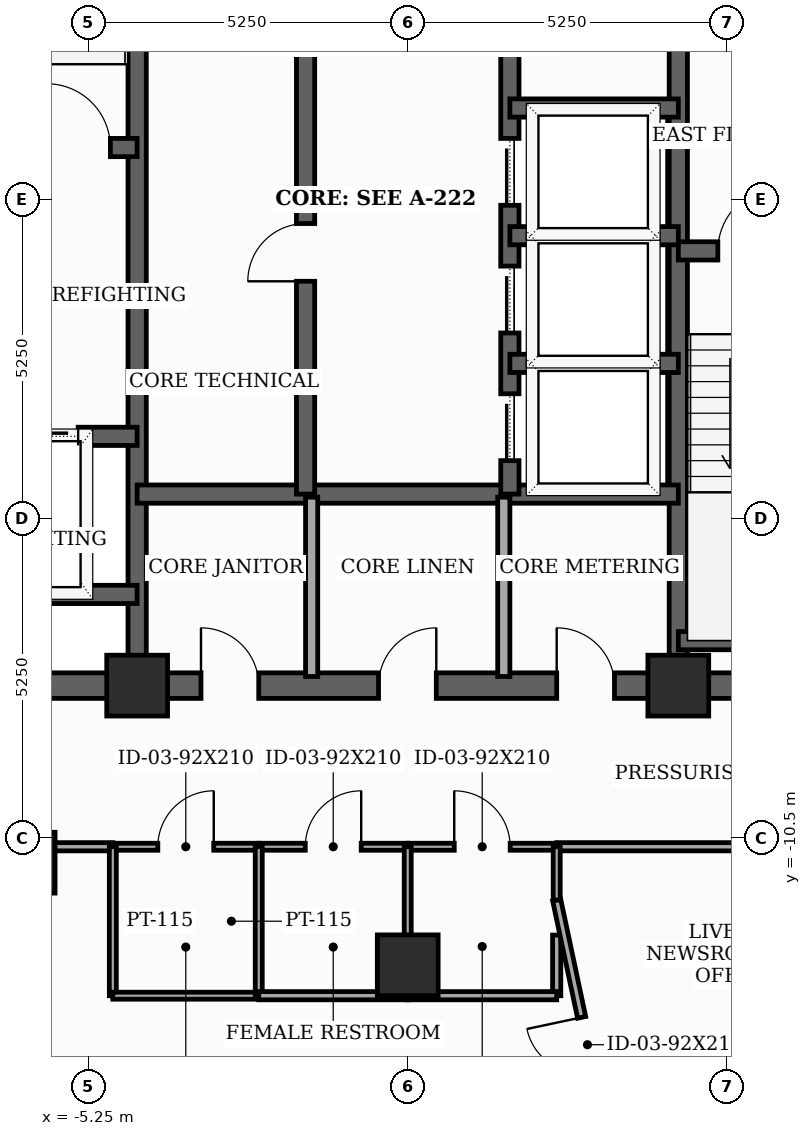
"""IFC4 building model, lengths in metres.
Left out: names, types, materials, properties, quantities, classifications, styles, units other than length and angle.
Written with IfcOpenShell. Run it as: python <this file> out.ifc"""

import sys

from ifc_helpers import new_model, si_unit, direction, frame, frame_2d, origin, origin_2d, place, context, subcontext, project, spatial, rectangle, extrude, element, fill, save


model = new_model("IFC4")
c1 = context("Model", 3, precision=1e-05, world=origin(), true_north=direction((0.0, 1.0)))
c2 = subcontext(c1, "Body", "Model", "MODEL_VIEW")
j1 = project(units=[si_unit("LENGTHUNIT", "METRE"), si_unit("PLANEANGLEUNIT", "RADIAN")], contexts=[c1])
p1 = place(None, origin())
s1 = spatial("IfcSite", under=j1, at=p1, CompositionType="ELEMENT")
p2 = place(p1, origin())
s2 = spatial("IfcBuilding", under=s1, at=p2, CompositionType="ELEMENT")
p3 = place(p2, frame((0.0, 0.0, 267.0)))
s3 = spatial("IfcBuildingStorey", under=s2, at=p3, CompositionType="ELEMENT", Elevation=267.0)
for number, where, z_axis, x_axis in (
    (1, (-4.45, -8.0, 0.0), (0.0, 0.0, 1.0), (1.0, 0.0, 0.0)),
    (2, (4.45, -8.0, 0.0), (0.0, 0.0, 1.0), (1.0, 0.0, 0.0)),
    (3, (-6.3, -10.912, 0.0), (0.0, 0.0, 1.0), (1.0, 0.0, 0.0)),
    (4, (0.0, -12.6, 0.0), (0.0, 0.0, 1.0), (1.0, 0.0, 0.0)),
):
    element("IfcColumn", number, at=place(p3, frame(where, z_axis=z_axis, x_axis=x_axis)), inside=s3, PredefinedType="COLUMN", context=c2, shape_type="SweptSolid", body=[
        extrude(rectangle(XDim=1.0, YDim=1.0, at=origin_2d()), origin(), (0.0, 0.0, 1.0), 3.7),
    ])
p4 = place(p3, frame((-8.0, -8.0, 0.0), z_axis=(0.0, 0.0, 1.0), x_axis=(1.0, 0.0, 0.0)))
e5 = element("IfcWall", 5, at=p4, inside=s3, PredefinedType="SHEAR", context=c2, shape_type="SweptSolid", body=[
    extrude(rectangle(XDim=16.0, YDim=0.42, at=frame_2d((8.0, 0.0))), origin(), (0.0, 0.0, 1.0), 3.5),
])
p5 = place(p4, frame((4.6, 0.0, 0.0)))
e6 = element("IfcOpeningElement", 6, at=p5, cuts=e5, PredefinedType="OPENING", context=c2, shape_type="SweptSolid", body=[
    extrude(rectangle(XDim=0.95, YDim=2.1, at=frame_2d((0.475, 1.05))), frame((0.0, 0.22, 0.0), z_axis=(0.0, -1.0, 0.0), x_axis=(1.0, 0.0, 0.0)), (0.0, 0.0, 1.0), 0.44),
])
p6 = place(p4, frame((7.52, 0.0, 0.0)))
e7 = element("IfcOpeningElement", 7, at=p6, cuts=e5, PredefinedType="OPENING", context=c2, shape_type="SweptSolid", body=[
    extrude(rectangle(XDim=0.95, YDim=2.1, at=frame_2d((0.475, 1.05))), frame((0.0, 0.22, 0.0), z_axis=(0.0, -1.0, 0.0), x_axis=(1.0, 0.0, 0.0)), (0.0, 0.0, 1.0), 0.44),
])
p7 = place(p4, frame((10.45, 0.0, 0.0)))
e8 = element("IfcOpeningElement", 8, at=p7, cuts=e5, PredefinedType="OPENING", context=c2, shape_type="SweptSolid", body=[
    extrude(rectangle(XDim=0.95, YDim=2.1, at=frame_2d((0.475, 1.05))), frame((0.0, 0.22, 0.0), z_axis=(0.0, -1.0, 0.0), x_axis=(1.0, 0.0, 0.0)), (0.0, 0.0, 1.0), 0.44),
])
for number, where, z_axis, x_axis in (
    (9, (-4.45, -7.79, 0.0), (0.0, 0.0, 1.0), (0.0, 1.0, 0.0)),
    (10, (4.45, -7.79, 0.0), (0.0, 0.0, 1.0), (0.0, 1.0, 0.0)),
):
    element("IfcWall", number, at=place(p3, frame(where, z_axis=z_axis, x_axis=x_axis)), inside=s3, PredefinedType="SHEAR", context=c2, shape_type="SweptSolid", body=[
        extrude(rectangle(XDim=15.58, YDim=0.3, at=frame_2d((7.79, 0.0))), origin(), (0.0, 0.0, 1.0), 3.5),
    ])
p8 = place(p3, frame((-7.79, 0.85, 0.0), z_axis=(0.0, 0.0, 1.0), x_axis=(1.0, 0.0, 0.0)))
e11 = element("IfcWall", 11, at=p8, inside=s3, PredefinedType="SHEAR", context=c2, shape_type="SweptSolid", body=[
    extrude(rectangle(XDim=3.34, YDim=0.3, at=frame_2d((1.67, 0.0))), origin(), (0.0, 0.0, 1.0), 3.5),
])
p9 = place(p8, frame((1.85, 0.0, 0.0)))
e12 = element("IfcOpeningElement", 12, at=p9, cuts=e11, PredefinedType="OPENING", context=c2, shape_type="SweptSolid", body=[
    extrude(rectangle(XDim=1.05, YDim=2.15, at=frame_2d((0.525, 1.075))), frame((0.0, 0.16, 0.0), z_axis=(0.0, -1.0, 0.0), x_axis=(1.0, 0.0, 0.0)), (0.0, 0.0, 1.0), 0.32),
])
p10 = place(p3, frame((4.45, -0.85, 0.0), z_axis=(0.0, 0.0, 1.0), x_axis=(1.0, 0.0, 0.0)))
e13 = element("IfcWall", 13, at=p10, inside=s3, PredefinedType="SHEAR", context=c2, shape_type="SweptSolid", body=[
    extrude(rectangle(XDim=3.34, YDim=0.3, at=frame_2d((1.67, 0.0))), origin(), (0.0, 0.0, 1.0), 3.5),
])
p11 = place(p10, frame((0.65, 0.0, 0.0)))
e14 = element("IfcOpeningElement", 14, at=p11, cuts=e13, PredefinedType="OPENING", context=c2, shape_type="SweptSolid", body=[
    extrude(rectangle(XDim=1.05, YDim=2.15, at=frame_2d((0.525, 1.075))), frame((0.0, 0.16, 0.0), z_axis=(0.0, -1.0, 0.0), x_axis=(1.0, 0.0, 0.0)), (0.0, 0.0, 1.0), 0.32),
])
p12 = place(p3, frame((4.45, -7.26, 0.0), z_axis=(0.0, 0.0, 1.0), x_axis=(1.0, 0.0, 0.0)))
e15 = element("IfcWall", 15, at=p12, inside=s3, PredefinedType="SHEAR", context=c2, shape_type="SweptSolid", body=[
    extrude(rectangle(XDim=3.55, YDim=0.3, at=frame_2d((1.775, 0.0))), origin(), (0.0, 0.0, 1.0), 3.5),
])
p13 = place(p3, frame((-7.79, -3.9, 0.0), z_axis=(0.0, 0.0, 1.0), x_axis=(1.0, 0.0, 0.0)))
e16 = element("IfcWall", 16, at=p13, inside=s3, PredefinedType="SHEAR", context=c2, shape_type="SweptSolid", body=[
    extrude(rectangle(XDim=3.34, YDim=0.3, at=frame_2d((1.67, 0.0))), origin(), (0.0, 0.0, 1.0), 3.5),
])
p14 = place(p13, frame((1.27, 0.0, 0.0)))
e17 = element("IfcOpeningElement", 17, at=p14, cuts=e16, PredefinedType="OPENING", context=c2, shape_type="SweptSolid", body=[
    extrude(rectangle(XDim=1.1, YDim=2.1, at=frame_2d((0.55, 1.05))), frame((0.0, 0.16, 0.0), z_axis=(0.0, -1.0, 0.0), x_axis=(1.0, 0.0, 0.0)), (0.0, 0.0, 1.0), 0.32),
])
p15 = place(p3, frame((-7.79, -6.5, 0.0), z_axis=(0.0, 0.0, 1.0), x_axis=(1.0, 0.0, 0.0)))
e18 = element("IfcWall", 18, at=p15, inside=s3, PredefinedType="SHEAR", context=c2, shape_type="SweptSolid", body=[
    extrude(rectangle(XDim=3.34, YDim=0.3, at=frame_2d((1.67, 0.0))), origin(), (0.0, 0.0, 1.0), 3.5),
])
p16 = place(p3, frame((-4.45, -4.85, 0.0), z_axis=(0.0, 0.0, 1.0), x_axis=(1.0, 0.0, 0.0)))
e19 = element("IfcWall", 19, at=p16, inside=s3, PredefinedType="SHEAR", context=c2, shape_type="SweptSolid", body=[
    extrude(rectangle(XDim=8.9, YDim=0.3, at=frame_2d((4.45, 0.0))), origin(), (0.0, 0.0, 1.0), 3.5),
])
p17 = place(p3, frame((-1.68, -4.85, 0.0), z_axis=(0.0, 0.0, 1.0), x_axis=(0.0, 1.0, 0.0)))
e20 = element("IfcWall", 20, at=p17, inside=s3, PredefinedType="SHEAR", context=c2, shape_type="SweptSolid", body=[
    extrude(rectangle(XDim=12.64, YDim=0.3, at=frame_2d((6.32, 0.0))), origin(), (0.0, 0.0, 1.0), 3.5),
])
p18 = place(p17, frame((3.5, 0.0, 0.0)))
e21 = element("IfcOpeningElement", 21, at=p18, cuts=e20, PredefinedType="OPENING", context=c2, shape_type="SweptSolid", body=[
    extrude(rectangle(XDim=0.95, YDim=2.1, at=frame_2d((0.475, 1.05))), frame((0.0, 0.16, 0.0), z_axis=(0.0, -1.0, 0.0), x_axis=(1.0, 0.0, 0.0)), (0.0, 0.0, 1.0), 0.32),
])
p19 = place(p17, frame((9.8, 0.0, 0.0)))
e22 = element("IfcOpeningElement", 22, at=p19, cuts=e20, PredefinedType="OPENING", context=c2, shape_type="SweptSolid", body=[
    extrude(rectangle(XDim=0.95, YDim=2.1, at=frame_2d((0.475, 1.05))), frame((0.0, 0.16, 0.0), z_axis=(0.0, -1.0, 0.0), x_axis=(1.0, 0.0, 0.0)), (0.0, 0.0, 1.0), 0.32),
])
p20 = place(p3, frame((1.68, -4.85, 0.0), z_axis=(0.0, 0.0, 1.0), x_axis=(0.0, 1.0, 0.0)))
e23 = element("IfcWall", 23, at=p20, inside=s3, PredefinedType="SHEAR", context=c2, shape_type="SweptSolid", body=[
    extrude(rectangle(XDim=12.64, YDim=0.3, at=frame_2d((6.32, 0.0))), origin(), (0.0, 0.0, 1.0), 3.5),
])
p21 = place(p20, frame((0.55, 0.0, 0.0)))
e24 = element("IfcOpeningElement", 24, at=p21, cuts=e23, PredefinedType="OPENING", context=c2, shape_type="SweptSolid", body=[
    extrude(rectangle(XDim=1.1, YDim=2.1, at=frame_2d((0.55, 1.05))), frame((0.0, 0.16, 0.0), z_axis=(0.0, -1.0, 0.0), x_axis=(1.0, 0.0, 0.0)), (0.0, 0.0, 1.0), 0.32),
])
p22 = place(p20, frame((2.65, 0.0, 0.0)))
e25 = element("IfcOpeningElement", 25, at=p22, cuts=e23, PredefinedType="OPENING", context=c2, shape_type="SweptSolid", body=[
    extrude(rectangle(XDim=1.1, YDim=2.1, at=frame_2d((0.55, 1.05))), frame((0.0, 0.16, 0.0), z_axis=(0.0, -1.0, 0.0), x_axis=(1.0, 0.0, 0.0)), (0.0, 0.0, 1.0), 0.32),
])
p23 = place(p20, frame((4.75, 0.0, 0.0)))
e26 = element("IfcOpeningElement", 26, at=p23, cuts=e23, PredefinedType="OPENING", context=c2, shape_type="SweptSolid", body=[
    extrude(rectangle(XDim=1.1, YDim=2.1, at=frame_2d((0.55, 1.05))), frame((0.0, 0.16, 0.0), z_axis=(0.0, -1.0, 0.0), x_axis=(1.0, 0.0, 0.0)), (0.0, 0.0, 1.0), 0.32),
])
p24 = place(p20, frame((8.9, 0.0, 0.0)))
e27 = element("IfcOpeningElement", 27, at=p24, cuts=e23, PredefinedType="OPENING", context=c2, shape_type="SweptSolid", body=[
    extrude(rectangle(XDim=0.95, YDim=2.1, at=frame_2d((0.475, 1.05))), frame((0.0, 0.16, 0.0), z_axis=(0.0, -1.0, 0.0), x_axis=(1.0, 0.0, 0.0)), (0.0, 0.0, 1.0), 0.32),
])
for number, where, z_axis, x_axis in (
    (28, (1.68, 1.5, 0.0), (0.0, 0.0, 1.0), (1.0, 0.0, 0.0)),
    (29, (1.68, -2.7, 0.0), (0.0, 0.0, 1.0), (1.0, 0.0, 0.0)),
    (30, (1.68, -0.6, 0.0), (0.0, 0.0, 1.0), (1.0, 0.0, 0.0)),
):
    element("IfcWall", number, at=place(p3, frame(where, z_axis=z_axis, x_axis=x_axis)), inside=s3, PredefinedType="SHEAR", context=c2, shape_type="SweptSolid", body=[
        extrude(rectangle(XDim=2.77, YDim=0.3, at=frame_2d((1.385, 0.0))), origin(), (0.0, 0.0, 1.0), 3.5),
    ])
for number, where, z_axis, x_axis in (
    (31, (-1.58, -7.85, 0.0), (0.0, 0.0, 1.0), (0.0, 1.0, 0.0)),
    (32, (1.58, -7.85, 0.0), (0.0, 0.0, 1.0), (0.0, 1.0, 0.0)),
):
    element("IfcWall", number, at=place(p3, frame(where, z_axis=z_axis, x_axis=x_axis)), inside=s3, PredefinedType="SOLIDWALL", context=c2, shape_type="SweptSolid", body=[
        extrude(rectangle(XDim=2.95, YDim=0.2, at=frame_2d((1.475, 0.0))), origin(), (0.0, 0.0, 1.0), 2.885),
    ])
p25 = place(p3, frame((-4.85, -10.65, 0.0), z_axis=(0.0, 0.0, 1.0), x_axis=(1.0, 0.0, 0.0)))
e33 = element("IfcWall", 33, at=p25, inside=s3, PredefinedType="PARTITIONING", context=c2, shape_type="SweptSolid", body=[
    extrude(rectangle(XDim=2.4, YDim=0.115, at=frame_2d((1.2, 0.0))), origin(), (0.0, 0.0, 1.0), 3.5),
])
p26 = place(p25, frame((0.74, 0.0, 0.0)))
e34 = element("IfcOpeningElement", 34, at=p26, cuts=e33, PredefinedType="OPENING", context=c2, shape_type="SweptSolid", body=[
    extrude(rectangle(XDim=0.92, YDim=2.1, at=frame_2d((0.46, 1.05))), frame((0.0, 0.067, 0.0), z_axis=(0.0, -1.0, 0.0), x_axis=(1.0, 0.0, 0.0)), (0.0, 0.0, 1.0), 0.135),
])
p27 = place(p3, frame((-10.15, -10.65, 0.0), z_axis=(0.0, 0.0, 1.0), x_axis=(1.0, 0.0, 0.0)))
e35 = element("IfcWall", 35, at=p27, inside=s3, PredefinedType="PARTITIONING", context=c2, shape_type="SweptSolid", body=[
    extrude(rectangle(XDim=5.3, YDim=0.135, at=frame_2d((2.65, 0.0))), origin(), (0.0, 0.0, 1.0), 2.885),
])
p28 = place(p3, frame((-2.45, -10.65, 0.0), z_axis=(0.0, 0.0, 1.0), x_axis=(1.0, 0.0, 0.0)))
e36 = element("IfcWall", 36, at=p28, inside=s3, PredefinedType="PARTITIONING", context=c2, shape_type="SweptSolid", body=[
    extrude(rectangle(XDim=2.45, YDim=0.115, at=frame_2d((1.225, 0.0))), origin(), (0.0, 0.0, 1.0), 2.885),
])
p29 = place(p28, frame((0.765, 0.0, 0.0)))
e37 = element("IfcOpeningElement", 37, at=p29, cuts=e36, PredefinedType="OPENING", context=c2, shape_type="SweptSolid", body=[
    extrude(rectangle(XDim=0.92, YDim=2.1, at=frame_2d((0.46, 1.05))), frame((0.0, 0.067, 0.0), z_axis=(0.0, -1.0, 0.0), x_axis=(1.0, 0.0, 0.0)), (0.0, 0.0, 1.0), 0.135),
])
p30 = place(p3, frame((0.0, -10.65, 0.0), z_axis=(0.0, 0.0, 1.0), x_axis=(1.0, 0.0, 0.0)))
e38 = element("IfcWall", 38, at=p30, inside=s3, PredefinedType="PARTITIONING", context=c2, shape_type="SweptSolid", body=[
    extrude(rectangle(XDim=2.45, YDim=0.115, at=frame_2d((1.225, 0.0))), origin(), (0.0, 0.0, 1.0), 3.5),
])
p31 = place(p30, frame((0.765, 0.0, 0.0)))
e39 = element("IfcOpeningElement", 39, at=p31, cuts=e38, PredefinedType="OPENING", context=c2, shape_type="SweptSolid", body=[
    extrude(rectangle(XDim=0.92, YDim=2.1, at=frame_2d((0.46, 1.05))), frame((0.0, 0.067, 0.0), z_axis=(0.0, -1.0, 0.0), x_axis=(1.0, 0.0, 0.0)), (0.0, 0.0, 1.0), 0.135),
])
p32 = place(p3, frame((2.45, -10.65, 0.0), z_axis=(0.0, 0.0, 1.0), x_axis=(1.0, 0.0, 0.0)))
e40 = element("IfcWall", 40, at=p32, inside=s3, PredefinedType="PARTITIONING", context=c2, shape_type="SweptSolid", body=[
    extrude(rectangle(XDim=7.7, YDim=0.135, at=frame_2d((3.85, 0.0))), origin(), (0.0, 0.0, 1.0), 2.885),
])
p33 = place(p3, frame((-4.85, -10.65, 0.0), z_axis=(0.0, 0.0, 1.0), x_axis=(0.0, -1.0, 0.0)))
e41 = element("IfcWall", 41, at=p33, inside=s3, PredefinedType="PARTITIONING", context=c2, shape_type="SweptSolid", body=[
    extrude(rectangle(XDim=2.45, YDim=0.115, at=frame_2d((1.225, 0.0))), origin(), (0.0, 0.0, 1.0), 2.885),
])
p34 = place(p3, frame((-4.85, -13.1, 0.0), z_axis=(0.0, 0.0, 1.0), x_axis=(1.0, 0.0, 0.0)))
e42 = element("IfcWall", 42, at=p34, inside=s3, PredefinedType="PARTITIONING", context=c2, shape_type="SweptSolid", body=[
    extrude(rectangle(XDim=2.4, YDim=0.115, at=frame_2d((1.2, 0.0))), origin(), (0.0, 0.0, 1.0), 3.5),
])
p35 = place(p3, frame((-2.45, -13.1, 0.0), z_axis=(0.0, 0.0, 1.0), x_axis=(0.0, 1.0, 0.0)))
e43 = element("IfcWall", 43, at=p35, inside=s3, PredefinedType="PARTITIONING", context=c2, shape_type="SweptSolid", body=[
    extrude(rectangle(XDim=2.45, YDim=0.115, at=frame_2d((1.225, 0.0))), origin(), (0.0, 0.0, 1.0), 2.885),
])
p36 = place(p3, frame((0.0, -13.1, 0.0), z_axis=(0.0, 0.0, 1.0), x_axis=(-1.0, 0.0, 0.0)))
e44 = element("IfcWall", 44, at=p36, inside=s3, PredefinedType="PARTITIONING", context=c2, shape_type="SweptSolid", body=[
    extrude(rectangle(XDim=2.45, YDim=0.135, at=frame_2d((1.225, 0.0))), origin(), (0.0, 0.0, 1.0), 3.5),
])
p37 = place(p3, frame((2.45, -12.103, 0.0), z_axis=(0.0, 0.0, 1.0), x_axis=(0.0, -1.0, 0.0)))
e45 = element("IfcWall", 45, at=p37, inside=s3, PredefinedType="PARTITIONING", context=c2, shape_type="SweptSolid", body=[
    extrude(rectangle(XDim=0.997, YDim=0.135, at=frame_2d((0.499, 0.0))), origin(), (0.0, 0.0, 1.0), 2.885),
])
p38 = place(p3, frame((2.45, -13.1, 0.0), z_axis=(0.0, 0.0, 1.0), x_axis=(-1.0, 0.0, 0.0)))
e46 = element("IfcWall", 46, at=p38, inside=s3, PredefinedType="PARTITIONING", context=c2, shape_type="SweptSolid", body=[
    extrude(rectangle(XDim=2.45, YDim=0.135, at=frame_2d((1.225, 0.0))), origin(), (0.0, 0.0, 1.0), 3.5),
])
p39 = place(p3, frame((3.266, -15.365, 0.0), z_axis=(0.0, 0.0, 1.0), x_axis=(-0.207944308429, 0.978140667078, 0.0)))
e47 = element("IfcWall", 47, at=p39, inside=s3, PredefinedType="PARTITIONING", context=c2, shape_type="SweptSolid", body=[
    extrude(rectangle(XDim=3.925, YDim=0.135, at=frame_2d((1.962, 0.0))), origin(), (0.0, 0.0, 1.0), 2.885),
])
p40 = place(p39, frame((1.031, 0.0, 0.0)))
e48 = element("IfcOpeningElement", 48, at=p40, cuts=e47, PredefinedType="OPENING", context=c2, shape_type="SweptSolid", body=[
    extrude(rectangle(XDim=0.92, YDim=2.1, at=frame_2d((0.46, 1.05))), frame((0.0, 0.077, 0.0), z_axis=(0.0, -1.0, 0.0), x_axis=(1.0, 0.0, 0.0)), (0.0, 0.0, 1.0), 0.155),
])
p41 = place(p3, frame((0.0, -13.1, 0.0), z_axis=(0.0, 0.0, 1.0), x_axis=(0.0, 1.0, 0.0)))
e49 = element("IfcWall", 49, at=p41, inside=s3, PredefinedType="PARTITIONING", context=c2, shape_type="SweptSolid", body=[
    extrude(rectangle(XDim=2.45, YDim=0.115, at=frame_2d((1.225, 0.0))), origin(), (0.0, 0.0, 1.0), 2.885),
])
p42 = place(p3, frame((2.45, -11.526, 0.0), z_axis=(0.0, 0.0, 1.0), x_axis=(0.0, 1.0, 0.0)))
e50 = element("IfcWall", 50, at=p42, inside=s3, PredefinedType="PARTITIONING", context=c2, shape_type="SweptSolid", body=[
    extrude(rectangle(XDim=0.876, YDim=0.115, at=frame_2d((0.438, 0.0))), origin(), (0.0, 0.0, 1.0), 3.5),
])
p43 = place(p3, frame((9.509, -12.618, 0.0), z_axis=(0.0, 0.0, 1.0), x_axis=(-0.915305003879, -0.402761405641, 0.0)))
e51 = element("IfcWall", 51, at=p43, inside=s3, PredefinedType="PARTITIONING", context=c2, shape_type="SweptSolid", body=[
    extrude(rectangle(XDim=6.821, YDim=0.135, at=frame_2d((3.41, 0.0))), origin(), (0.0, 0.0, 1.0), 3.035),
])
p44 = place(p5, origin())
e52 = element("IfcDoor", 52, at=p44, inside=s3, OperationType="SINGLE_SWING_LEFT", PredefinedType="DOOR", context=c2, shape_type="SweptSolid", body=[
    extrude(rectangle(XDim=0.95, YDim=2.1, at=frame_2d((0.475, 1.05))), frame((0.0, 0.025, 0.0), z_axis=(0.0, -1.0, 0.0), x_axis=(1.0, 0.0, 0.0)), (0.0, 0.0, 1.0), 0.05),
])
fill(e6, e52)
p45 = place(p6, origin())
e53 = element("IfcDoor", 53, at=p45, inside=s3, OperationType="SINGLE_SWING_RIGHT", PredefinedType="DOOR", context=c2, shape_type="SweptSolid", body=[
    extrude(rectangle(XDim=0.95, YDim=2.1, at=frame_2d((0.475, 1.05))), frame((0.0, 0.025, 0.0), z_axis=(0.0, -1.0, 0.0), x_axis=(1.0, 0.0, 0.0)), (0.0, 0.0, 1.0), 0.05),
])
fill(e7, e53)
p46 = place(p7, origin())
e54 = element("IfcDoor", 54, at=p46, inside=s3, OperationType="SINGLE_SWING_LEFT", PredefinedType="DOOR", context=c2, shape_type="SweptSolid", body=[
    extrude(rectangle(XDim=0.95, YDim=2.1, at=frame_2d((0.475, 1.05))), frame((0.0, 0.025, 0.0), z_axis=(0.0, -1.0, 0.0), x_axis=(1.0, 0.0, 0.0)), (0.0, 0.0, 1.0), 0.05),
])
fill(e8, e54)
p47 = place(p9, origin())
e55 = element("IfcDoor", 55, at=p47, inside=s3, OperationType="SINGLE_SWING_LEFT", PredefinedType="DOOR", context=c2, shape_type="SweptSolid", body=[
    extrude(rectangle(XDim=1.05, YDim=2.15, at=frame_2d((0.525, 1.075))), frame((0.0, 0.025, 0.0), z_axis=(0.0, -1.0, 0.0), x_axis=(1.0, 0.0, 0.0)), (0.0, 0.0, 1.0), 0.05),
])
fill(e12, e55)
p48 = place(p11, origin())
e56 = element("IfcDoor", 56, at=p48, inside=s3, OperationType="SINGLE_SWING_RIGHT", PredefinedType="DOOR", context=c2, shape_type="SweptSolid", body=[
    extrude(rectangle(XDim=1.05, YDim=2.15, at=frame_2d((0.525, 1.075))), frame((0.0, 0.025, 0.0), z_axis=(0.0, -1.0, 0.0), x_axis=(1.0, 0.0, 0.0)), (0.0, 0.0, 1.0), 0.05),
])
fill(e14, e56)
p49 = place(p14, origin())
e57 = element("IfcDoor", 57, at=p49, inside=s3, OperationType="SLIDING_TO_LEFT", PredefinedType="DOOR", context=c2, shape_type="SweptSolid", body=[
    extrude(rectangle(XDim=1.1, YDim=2.1, at=frame_2d((0.55, 1.05))), frame((0.0, 0.025, 0.0), z_axis=(0.0, -1.0, 0.0), x_axis=(1.0, 0.0, 0.0)), (0.0, 0.0, 1.0), 0.05),
])
fill(e17, e57)
p50 = place(p18, origin())
e58 = element("IfcDoor", 58, at=p50, inside=s3, OperationType="SINGLE_SWING_LEFT", PredefinedType="DOOR", context=c2, shape_type="SweptSolid", body=[
    extrude(rectangle(XDim=0.95, YDim=2.1, at=frame_2d((0.475, 1.05))), frame((0.0, 0.025, 0.0), z_axis=(0.0, -1.0, 0.0), x_axis=(1.0, 0.0, 0.0)), (0.0, 0.0, 1.0), 0.05),
])
fill(e21, e58)
p51 = place(p21, origin())
e59 = element("IfcDoor", 59, at=p51, inside=s3, OperationType="SLIDING_TO_LEFT", PredefinedType="DOOR", context=c2, shape_type="SweptSolid", body=[
    extrude(rectangle(XDim=1.1, YDim=2.1, at=frame_2d((0.55, 1.05))), frame((0.0, 0.025, 0.0), z_axis=(0.0, -1.0, 0.0), x_axis=(1.0, 0.0, 0.0)), (0.0, 0.0, 1.0), 0.05),
])
fill(e24, e59)
p52 = place(p22, origin())
e60 = element("IfcDoor", 60, at=p52, inside=s3, OperationType="SLIDING_TO_LEFT", PredefinedType="DOOR", context=c2, shape_type="SweptSolid", body=[
    extrude(rectangle(XDim=1.1, YDim=2.1, at=frame_2d((0.55, 1.05))), frame((0.0, 0.025, 0.0), z_axis=(0.0, -1.0, 0.0), x_axis=(1.0, 0.0, 0.0)), (0.0, 0.0, 1.0), 0.05),
])
fill(e25, e60)
p53 = place(p23, origin())
e61 = element("IfcDoor", 61, at=p53, inside=s3, OperationType="SLIDING_TO_LEFT", PredefinedType="DOOR", context=c2, shape_type="SweptSolid", body=[
    extrude(rectangle(XDim=1.1, YDim=2.1, at=frame_2d((0.55, 1.05))), frame((0.0, 0.025, 0.0), z_axis=(0.0, -1.0, 0.0), x_axis=(1.0, 0.0, 0.0)), (0.0, 0.0, 1.0), 0.05),
])
fill(e26, e61)
p54 = place(p26, origin())
e62 = element("IfcDoor", 62, at=p54, inside=s3, OperationType="SINGLE_SWING_RIGHT", PredefinedType="DOOR", context=c2, shape_type="SweptSolid", body=[
    extrude(rectangle(XDim=0.92, YDim=2.1, at=frame_2d((0.46, 1.05))), frame((0.0, 0.025, 0.0), z_axis=(0.0, -1.0, 0.0), x_axis=(1.0, 0.0, 0.0)), (0.0, 0.0, 1.0), 0.05),
])
fill(e34, e62)
p55 = place(p29, origin())
e63 = element("IfcDoor", 63, at=p55, inside=s3, OperationType="SINGLE_SWING_RIGHT", PredefinedType="DOOR", context=c2, shape_type="SweptSolid", body=[
    extrude(rectangle(XDim=0.92, YDim=2.1, at=frame_2d((0.46, 1.05))), frame((0.0, 0.025, 0.0), z_axis=(0.0, -1.0, 0.0), x_axis=(1.0, 0.0, 0.0)), (0.0, 0.0, 1.0), 0.05),
])
fill(e37, e63)
p56 = place(p31, origin())
e64 = element("IfcDoor", 64, at=p56, inside=s3, OperationType="SINGLE_SWING_LEFT", PredefinedType="DOOR", context=c2, shape_type="SweptSolid", body=[
    extrude(rectangle(XDim=0.92, YDim=2.1, at=frame_2d((0.46, 1.05))), frame((0.0, 0.025, 0.0), z_axis=(0.0, -1.0, 0.0), x_axis=(1.0, 0.0, 0.0)), (0.0, 0.0, 1.0), 0.05),
])
fill(e39, e64)
p57 = place(p40, origin())
e65 = element("IfcDoor", 65, at=p57, inside=s3, OperationType="SINGLE_SWING_RIGHT", PredefinedType="DOOR", context=c2, shape_type="SweptSolid", body=[
    extrude(rectangle(XDim=0.92, YDim=2.1, at=frame_2d((0.46, 1.05))), frame((0.0, 0.025, 0.0), z_axis=(0.0, -1.0, 0.0), x_axis=(1.0, 0.0, 0.0)), (0.0, 0.0, 1.0), 0.05),
])
fill(e48, e65)
save(model, sys.argv[1])
